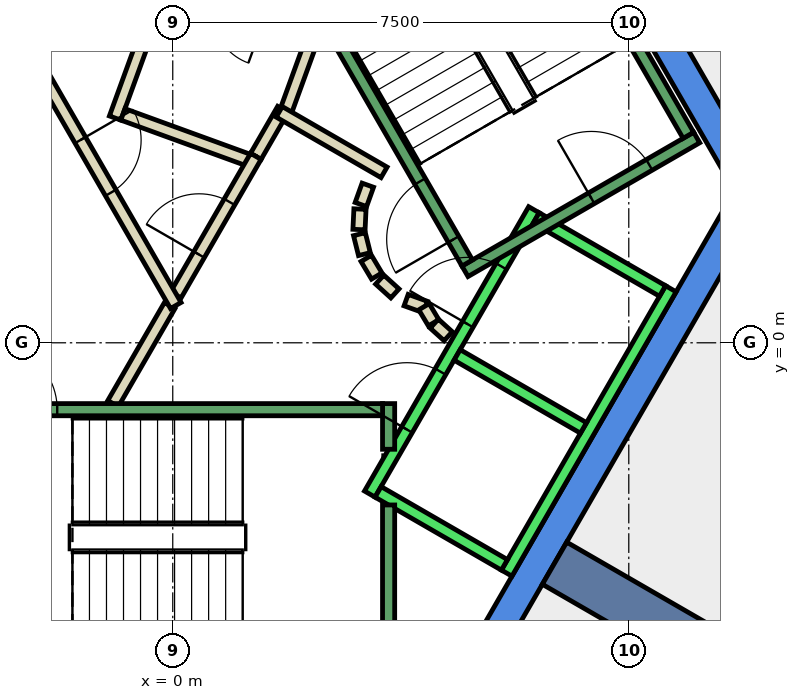
"""IFC4 building model, lengths in metres.
Left out: names, types, materials, properties, quantities, classifications, styles, units other than length and angle.
Written with IfcOpenShell. Run it as: python <this file> out.ifc"""

import sys

from ifc_helpers import new_model, si_unit, direction, frame, frame_2d, origin, place, context, subcontext, project, spatial, polyline, rectangle, outline, extrude, element, fill, save


model = new_model("IFC4")
c1 = context("Model", 3, precision=1e-05, world=origin(), true_north=direction((0.0, 1.0)))
c2 = subcontext(c1, "Body", "Model", "MODEL_VIEW")
j1 = project(units=[si_unit("LENGTHUNIT", "METRE"), si_unit("PLANEANGLEUNIT", "RADIAN")], contexts=[c1])
p1 = place(None, origin())
s1 = spatial("IfcSite", under=j1, at=p1, CompositionType="ELEMENT")
p2 = place(p1, origin())
s2 = spatial("IfcBuilding", under=s1, at=p2, CompositionType="ELEMENT")
p3 = place(p2, frame((0.0, 0.0, 322.4)))
s3 = spatial("IfcBuildingStorey", under=s2, at=p3, CompositionType="ELEMENT", Elevation=322.4)
p4 = place(p3, frame((0.0, 0.0, -0.34)))
e1 = element("IfcWall", 1, at=p4, inside=s3, PredefinedType="SHEAR", context=c2, shape_type="SweptSolid", body=[
    extrude(outline(polyline([(5.486, 9.998), (5.053, 9.748), (9.238, 2.5), (9.815, 2.5), (5.486, 9.998)])), origin(), (0.0, 0.0, 1.0), 3.34),
])
p5 = place(p3, frame((0.0, 0.0, -0.34)))
e2 = element("IfcWall", 2, at=p5, inside=s3, PredefinedType="SHEAR", context=c2, shape_type="SweptSolid", body=[
    extrude(outline(polyline([(4.907, -6.0), (9.815, 2.5), (9.238, 2.5), (4.619, -5.5), (4.907, -6.0)])), origin(), (0.0, 0.0, 1.0), 3.34),
])
p6 = place(p3, frame((6.279, -3.625, -0.34), z_axis=(0.0, 0.0, 1.0), x_axis=(0.866017533419, -0.500013631625, 0.0)))
e3 = element("IfcWall", 3, at=p6, inside=s3, PredefinedType="SHEAR", context=c2, shape_type="SweptSolid", body=[
    extrude(rectangle(XDim=9.0, YDim=0.8, at=frame_2d((4.5, 0.0))), origin(), (0.0, 0.0, 1.0), 3.34),
])
p7 = place(p3, frame((1.366, 3.066, 0.0), z_axis=(0.0, 0.0, 1.0), x_axis=(0.499698775601, 0.866199245938, 0.0)))
e4 = element("IfcWall", 4, at=p7, inside=s3, PredefinedType="PARTITIONING", context=c2, shape_type="SweptSolid", body=[
    extrude(rectangle(XDim=0.893, YDim=0.2, at=frame_2d((0.446, 0.0))), origin(), (0.0, 0.0, 1.0), 3.0),
])
p8 = place(p3, frame((1.838, 3.748, 0.0), z_axis=(0.0, 0.0, 1.0), x_axis=(0.341883255813, 0.939742432475, 0.0)))
e5 = element("IfcWall", 5, at=p8, inside=s3, PredefinedType="PARTITIONING", context=c2, shape_type="SweptSolid", body=[
    extrude(rectangle(XDim=1.398, YDim=0.2, at=frame_2d((0.699, 0.0))), origin(), (0.0, 0.0, 1.0), 3.0),
])
p9 = place(p3, frame((-0.127, 5.952, 0.0), z_axis=(0.0, 0.0, 1.0), x_axis=(-0.342012513308, -0.93969539785, 0.0)))
e6 = element("IfcWall", 6, at=p9, inside=s3, PredefinedType="PARTITIONING", context=c2, shape_type="SweptSolid", body=[
    extrude(rectangle(XDim=2.401, YDim=0.2, at=frame_2d((1.2, 0.0))), origin(), (0.0, 0.0, 1.0), 3.0),
])
p10 = place(p3, frame((-0.82, 3.756, 0.0), z_axis=(0.0, 0.0, 1.0), x_axis=(0.939740098492, -0.34188967122, 0.0)))
e7 = element("IfcWall", 7, at=p10, inside=s3, PredefinedType="PARTITIONING", context=c2, shape_type="SweptSolid", body=[
    extrude(rectangle(XDim=2.273, YDim=0.2, at=frame_2d((1.136, 0.0))), origin(), (0.0, 0.0, 1.0), 3.0),
])
p11 = place(p3, frame((-0.982, -1.0, 0.0), z_axis=(0.0, 0.0, 1.0), x_axis=(0.50024047865, 0.865886518847, 0.0)))
e8 = element("IfcWall", 8, at=p11, inside=s3, PredefinedType="PARTITIONING", context=c2, shape_type="SweptSolid", body=[
    extrude(rectangle(XDim=1.863, YDim=0.2, at=frame_2d((0.931, 0.0))), origin(), (0.0, 0.0, 1.0), 3.0),
])
p12 = place(p3, frame((0.05, 0.787, 0.0), z_axis=(0.0, 0.0, 1.0), x_axis=(0.500070457302, 0.865984721421, 0.0)))
e9 = element("IfcWall", 9, at=p12, inside=s3, PredefinedType="PARTITIONING", context=c2, shape_type="SweptSolid", body=[
    extrude(rectangle(XDim=2.631, YDim=0.2, at=frame_2d((1.316, 0.0))), origin(), (0.0, 0.0, 1.0), 3.0),
])
p13 = place(p12, frame((0.766, 0.0, 0.0)))
e10 = element("IfcOpeningElement", 10, at=p13, cuts=e9, PredefinedType="OPENING", context=c2, shape_type="SweptSolid", body=[
    extrude(rectangle(XDim=1.0, YDim=2.1, at=frame_2d((0.5, 1.05))), frame((0.0, 0.11, 0.0), z_axis=(0.0, -1.0, 0.0), x_axis=(1.0, 0.0, 0.0)), (0.0, 0.0, 1.0), 0.22),
])
p14 = place(p3, frame((1.751, 3.798, 0.0), z_axis=(0.0, 0.0, 1.0), x_axis=(0.866091650241, -0.499885240213, 0.0)))
e11 = element("IfcWall", 11, at=p14, inside=s3, PredefinedType="PARTITIONING", context=c2, shape_type="SweptSolid", body=[
    extrude(rectangle(XDim=1.991, YDim=0.2, at=frame_2d((0.995, 0.0))), origin(), (0.0, 0.0, 1.0), 3.0),
])
p15 = place(p3, frame((3.208, 2.592, 0.0), z_axis=(0.0, 0.0, 1.0), x_axis=(-0.337388820924, -0.941365382578, 0.0)))
e12 = element("IfcWall", 12, at=p15, inside=s3, PredefinedType="PARTITIONING", context=c2, shape_type="SweptSolid", body=[
    extrude(rectangle(XDim=0.338, YDim=0.2, at=frame_2d((0.169, 0.0))), origin(), (0.0, 0.0, 1.0), 3.0),
])
p16 = place(p3, frame((3.079, 2.199, 0.0), z_axis=(0.0, 0.0, 1.0), x_axis=(-0.047771483479, -0.998858290933, 0.0)))
e13 = element("IfcWall", 13, at=p16, inside=s3, PredefinedType="PARTITIONING", context=c2, shape_type="SweptSolid", body=[
    extrude(rectangle(XDim=0.337, YDim=0.2, at=frame_2d((0.169, 0.0))), origin(), (0.0, 0.0, 1.0), 3.0),
])
p17 = place(p3, frame((3.07, 1.786, 0.0), z_axis=(0.0, 0.0, 1.0), x_axis=(0.242705583207, -0.970099994784, 0.0)))
e14 = element("IfcWall", 14, at=p17, inside=s3, PredefinedType="PARTITIONING", context=c2, shape_type="SweptSolid", body=[
    extrude(rectangle(XDim=0.338, YDim=0.2, at=frame_2d((0.169, 0.0))), origin(), (0.0, 0.0, 1.0), 3.0),
])
for number, where, z_axis, x_axis in (
    (15, (3.182, 1.388, 0.0), (0.0, 0.0, 1.0), (0.512, -0.859, 0.0)),
    (16, (3.404, 1.039, 0.0), (0.0, 0.0, 1.0), (0.74, -0.672, 0.0)),
):
    element("IfcWall", number, at=place(p3, frame(where, z_axis=z_axis, x_axis=x_axis)), inside=s3, PredefinedType="PARTITIONING", context=c2, shape_type="SweptSolid", body=[
        extrude(rectangle(XDim=0.338, YDim=0.2, at=frame_2d((0.169, 0.0))), origin(), (0.0, 0.0, 1.0), 3.0),
    ])
p18 = place(p3, frame((3.838, 0.702, 0.0), z_axis=(0.0, 0.0, 1.0), x_axis=(0.941035081519, -0.338308993895, 0.0)))
e17 = element("IfcWall", 17, at=p18, inside=s3, PredefinedType="PARTITIONING", context=c2, shape_type="SweptSolid", body=[
    extrude(rectangle(XDim=0.337, YDim=0.2, at=frame_2d((0.168, 0.0))), origin(), (0.0, 0.0, 1.0), 3.0),
])
p19 = place(p3, frame((4.132, 0.593, 0.0), z_axis=(0.0, 0.0, 1.0), x_axis=(0.513561617048, -0.858052717201, 0.0)))
e18 = element("IfcWall", 18, at=p19, inside=s3, PredefinedType="PARTITIONING", context=c2, shape_type="SweptSolid", body=[
    extrude(rectangle(XDim=0.308, YDim=0.2, at=frame_2d((0.154, 0.0))), origin(), (0.0, 0.0, 1.0), 3.0),
])
p20 = place(p3, frame((4.301, 0.315, 0.0), z_axis=(0.0, 0.0, 1.0), x_axis=(0.741798017506, -0.670623367639, 0.0)))
e19 = element("IfcWall", 19, at=p20, inside=s3, PredefinedType="PARTITIONING", context=c2, shape_type="SweptSolid", body=[
    extrude(rectangle(XDim=0.309, YDim=0.2, at=frame_2d((0.154, 0.0))), origin(), (0.0, 0.0, 1.0), 3.0),
])
p21 = place(p3, frame((-2.54, 5.1, 0.0), z_axis=(0.0, 0.0, 1.0), x_axis=(0.499925051871, -0.866068670783, 0.0)))
e20 = element("IfcWall", 20, at=p21, inside=s3, PredefinedType="PARTITIONING", context=c2, shape_type="SweptSolid", body=[
    extrude(rectangle(XDim=5.181, YDim=0.2, at=frame_2d((2.59, 0.0))), origin(), (0.0, 0.0, 1.0), 3.0),
])
p22 = place(p21, frame((2.04, 0.0, 0.0)))
e21 = element("IfcOpeningElement", 21, at=p22, cuts=e20, PredefinedType="OPENING", context=c2, shape_type="SweptSolid", body=[
    extrude(rectangle(XDim=1.0, YDim=2.1, at=frame_2d((0.5, 1.05))), frame((0.0, 0.11, 0.0), z_axis=(0.0, -1.0, 0.0), x_axis=(1.0, 0.0, 0.0)), (0.0, 0.0, 1.0), 0.22),
])
p23 = place(p3, frame((3.24, -2.488, 0.0), z_axis=(0.0, 0.0, 1.0), x_axis=(0.500034260056, 0.866005622828, 0.0)))
e22 = element("IfcWall", 22, at=p23, inside=s3, PredefinedType="STANDARD", context=c2, shape_type="SweptSolid", body=[
    extrude(rectangle(XDim=5.399, YDim=0.2, at=frame_2d((2.7, 0.0))), origin(), (0.0, 0.0, 1.0), 3.0),
])
p24 = place(p23, frame((3.225, 0.0, 0.0)))
e23 = element("IfcOpeningElement", 23, at=p24, cuts=e22, PredefinedType="OPENING", context=c2, shape_type="SweptSolid", body=[
    extrude(rectangle(XDim=1.1, YDim=2.1, at=frame_2d((0.55, 1.05))), frame((0.0, 0.11, 0.0), z_axis=(0.0, -1.0, 0.0), x_axis=(1.0, 0.0, 0.0)), (0.0, 0.0, 1.0), 0.22),
])
p25 = place(p23, frame((1.225, 0.0, 0.0)))
e24 = element("IfcOpeningElement", 24, at=p25, cuts=e22, PredefinedType="OPENING", context=c2, shape_type="SweptSolid", body=[
    extrude(rectangle(XDim=1.1, YDim=2.1, at=frame_2d((0.55, 1.05))), frame((0.0, 0.11, 0.0), z_axis=(0.0, -1.0, 0.0), x_axis=(1.0, 0.0, 0.0)), (0.0, 0.0, 1.0), 0.22),
])
p26 = place(p3, frame((5.492, -3.788, 0.0), z_axis=(0.0, 0.0, 1.0), x_axis=(0.500034260056, 0.866005622828, 0.0)))
e25 = element("IfcWall", 25, at=p26, inside=s3, PredefinedType="STANDARD", context=c2, shape_type="SweptSolid", body=[
    extrude(rectangle(XDim=5.399, YDim=0.2, at=frame_2d((2.7, 0.0))), origin(), (0.0, 0.0, 1.0), 3.0),
])
p27 = place(p3, frame((3.377, -2.452, 0.0), z_axis=(0.0, 0.0, 1.0), x_axis=(0.865955154139, -0.50012165622, 0.0)))
e26 = element("IfcWall", 26, at=p27, inside=s3, PredefinedType="STANDARD", context=c2, shape_type="SweptSolid", body=[
    extrude(rectangle(XDim=2.4, YDim=0.2, at=frame_2d((1.2, 0.0))), origin(), (0.0, 0.0, 1.0), 3.0),
])
for number, where, z_axis, x_axis in (
    (27, (4.677, -0.2, 0.0), (0.0, 0.0, 1.0), (0.866, -0.5, 0.0)),
    (28, (5.977, 2.052, 0.0), (0.0, 0.0, 1.0), (0.866, -0.5, 0.0)),
):
    element("IfcWall", number, at=place(p3, frame(where, z_axis=z_axis, x_axis=x_axis)), inside=s3, PredefinedType="STANDARD", context=c2, shape_type="SweptSolid", body=[
        extrude(rectangle(XDim=2.399, YDim=0.2, at=frame_2d((1.2, 0.0))), origin(), (0.0, 0.0, 1.0), 3.0),
    ])
p28 = place(p3, frame((3.55, -2.667, 0.0), z_axis=(0.0, 0.0, 1.0), x_axis=(0.0, -1.0, 0.0)))
e29 = element("IfcWall", 29, at=p28, inside=s3, PredefinedType="STANDARD", context=c2, shape_type="SweptSolid", body=[
    extrude(rectangle(XDim=2.733, YDim=0.2, at=frame_2d((1.366, 0.0))), origin(), (0.0, 0.0, 1.0), 3.0),
])
p29 = place(p3, frame((3.55, -1.0, 0.0), z_axis=(0.0, 0.0, 1.0), x_axis=(0.0, -1.0, 0.0)))
e30 = element("IfcWall", 30, at=p29, inside=s3, PredefinedType="STANDARD", context=c2, shape_type="SweptSolid", body=[
    extrude(rectangle(XDim=0.751, YDim=0.2, at=frame_2d((0.375, 0.0))), origin(), (0.0, 0.0, 1.0), 3.0),
])
p30 = place(p3, frame((-3.45, -1.1, 0.0), z_axis=(0.0, 0.0, 1.0), x_axis=(1.0, 0.0, 0.0)))
e31 = element("IfcWall", 31, at=p30, inside=s3, PredefinedType="STANDARD", context=c2, shape_type="SweptSolid", body=[
    extrude(rectangle(XDim=6.9, YDim=0.2, at=frame_2d((3.45, 0.0))), origin(), (0.0, 0.0, 1.0), 3.0),
])
p31 = place(p30, frame((0.45, 0.0, 0.0)))
e32 = element("IfcOpeningElement", 32, at=p31, cuts=e31, PredefinedType="OPENING", context=c2, shape_type="SweptSolid", body=[
    extrude(rectangle(XDim=1.1, YDim=2.2, at=frame_2d((0.55, 1.1))), frame((0.0, 0.11, 0.0), z_axis=(0.0, -1.0, 0.0), x_axis=(1.0, 0.0, 0.0)), (0.0, 0.0, 1.0), 0.22),
])
p32 = place(p3, frame((4.806, 1.176, 0.0), z_axis=(0.0, 0.0, 1.0), x_axis=(0.866059941101, 0.499940174841, 0.0)))
e33 = element("IfcWall", 33, at=p32, inside=s3, PredefinedType="STANDARD", context=c2, shape_type="SweptSolid", body=[
    extrude(rectangle(XDim=4.4, YDim=0.2, at=frame_2d((2.2, 0.0))), origin(), (0.0, 0.0, 1.0), 3.0),
])
p33 = place(p32, frame((2.4, 0.0, 0.0)))
e34 = element("IfcOpeningElement", 34, at=p33, cuts=e33, PredefinedType="OPENING", context=c2, shape_type="SweptSolid", body=[
    extrude(rectangle(XDim=1.1, YDim=2.2, at=frame_2d((0.55, 1.1))), frame((0.0, 0.11, 0.0), z_axis=(0.0, -1.0, 0.0), x_axis=(1.0, 0.0, 0.0)), (0.0, 0.0, 1.0), 0.22),
])
p34 = place(p3, frame((4.843, 1.312, 0.0), z_axis=(0.0, 0.0, 1.0), x_axis=(-0.499963383562, 0.866046543262, 0.0)))
e35 = element("IfcWall", 35, at=p34, inside=s3, PredefinedType="STANDARD", context=c2, shape_type="SweptSolid", body=[
    extrude(rectangle(XDim=6.9, YDim=0.2, at=frame_2d((3.45, 0.0))), origin(), (0.0, 0.0, 1.0), 3.0),
])
p35 = place(p34, frame((0.45, 0.0, 0.0)))
e36 = element("IfcOpeningElement", 36, at=p35, cuts=e35, PredefinedType="OPENING", context=c2, shape_type="SweptSolid", body=[
    extrude(rectangle(XDim=1.1, YDim=2.2, at=frame_2d((0.55, 1.1))), frame((0.0, 0.11, 0.0), z_axis=(0.0, -1.0, 0.0), x_axis=(1.0, 0.0, 0.0)), (0.0, 0.0, 1.0), 0.22),
])
p36 = place(p3, frame((8.48, 3.412, 0.0), z_axis=(0.0, 0.0, 1.0), x_axis=(-0.499978703459, 0.866037698999, 0.0)))
e37 = element("IfcWall", 37, at=p36, inside=s3, PredefinedType="STANDARD", context=c2, shape_type="SweptSolid", body=[
    extrude(rectangle(XDim=6.9, YDim=0.2, at=frame_2d((3.45, 0.0))), origin(), (0.0, 0.0, 1.0), 3.0),
])
p37 = place(p3, frame((-1.393, 7.288, 0.0), z_axis=(0.0, 0.0, 1.0), x_axis=(-0.499963383562, -0.866046543262, 0.0)))
e38 = element("IfcWall", 38, at=p37, inside=s3, PredefinedType="STANDARD", context=c2, shape_type="SweptSolid", body=[
    extrude(rectangle(XDim=6.9, YDim=0.2, at=frame_2d((3.45, 0.0))), origin(), (0.0, 0.0, 1.0), 3.0),
])
p38 = place(p37, frame((0.45, 0.0, 0.0)))
e39 = element("IfcOpeningElement", 39, at=p38, cuts=e38, PredefinedType="OPENING", context=c2, shape_type="SweptSolid", body=[
    extrude(rectangle(XDim=1.1, YDim=2.2, at=frame_2d((0.55, 1.1))), frame((0.0, 0.11, 0.0), z_axis=(0.0, -1.0, 0.0), x_axis=(1.0, 0.0, 0.0)), (0.0, 0.0, 1.0), 0.22),
])
p39 = place(p13, origin())
e40 = element("IfcDoor", 40, at=p39, inside=s3, OperationType="SINGLE_SWING_RIGHT", PredefinedType="DOOR", context=c2, shape_type="SweptSolid", body=[
    extrude(rectangle(XDim=1.0, YDim=2.1, at=frame_2d((0.5, 1.05))), frame((0.0, 0.025, 0.0), z_axis=(0.0, -1.0, 0.0), x_axis=(1.0, 0.0, 0.0)), (0.0, 0.0, 1.0), 0.05),
])
fill(e10, e40)
p40 = place(p22, origin())
e41 = element("IfcDoor", 41, at=p40, inside=s3, OperationType="SINGLE_SWING_RIGHT", PredefinedType="DOOR", context=c2, shape_type="SweptSolid", body=[
    extrude(rectangle(XDim=1.0, YDim=2.1, at=frame_2d((0.5, 1.05))), frame((0.0, 0.025, 0.0), z_axis=(0.0, -1.0, 0.0), x_axis=(1.0, 0.0, 0.0)), (0.0, 0.0, 1.0), 0.05),
])
fill(e21, e41)
p41 = place(p24, origin())
e42 = element("IfcDoor", 42, at=p41, inside=s3, OperationType="SLIDING_TO_LEFT", PredefinedType="DOOR", context=c2, shape_type="SweptSolid", body=[
    extrude(rectangle(XDim=1.1, YDim=2.1, at=frame_2d((0.55, 1.05))), frame((0.0, 0.025, 0.0), z_axis=(0.0, -1.0, 0.0), x_axis=(1.0, 0.0, 0.0)), (0.0, 0.0, 1.0), 0.05),
])
fill(e23, e42)
p42 = place(p25, origin())
e43 = element("IfcDoor", 43, at=p42, inside=s3, OperationType="SLIDING_TO_LEFT", PredefinedType="DOOR", context=c2, shape_type="SweptSolid", body=[
    extrude(rectangle(XDim=1.1, YDim=2.1, at=frame_2d((0.55, 1.05))), frame((0.0, 0.025, 0.0), z_axis=(0.0, -1.0, 0.0), x_axis=(1.0, 0.0, 0.0)), (0.0, 0.0, 1.0), 0.05),
])
fill(e24, e43)
p43 = place(p31, origin())
e44 = element("IfcDoor", 44, at=p43, inside=s3, OperationType="SINGLE_SWING_LEFT", PredefinedType="DOOR", context=c2, shape_type="SweptSolid", body=[
    extrude(rectangle(XDim=1.1, YDim=2.2, at=frame_2d((0.55, 1.1))), frame((0.0, 0.025, 0.0), z_axis=(0.0, -1.0, 0.0), x_axis=(1.0, 0.0, 0.0)), (0.0, 0.0, 1.0), 0.05),
])
fill(e32, e44)
p44 = place(p35, origin())
e45 = element("IfcDoor", 45, at=p44, inside=s3, OperationType="SINGLE_SWING_LEFT", PredefinedType="DOOR", context=c2, shape_type="SweptSolid", body=[
    extrude(rectangle(XDim=1.1, YDim=2.2, at=frame_2d((0.55, 1.1))), frame((0.0, 0.025, 0.0), z_axis=(0.0, -1.0, 0.0), x_axis=(1.0, 0.0, 0.0)), (0.0, 0.0, 1.0), 0.05),
])
fill(e36, e45)
p45 = place(p33, origin())
e46 = element("IfcDoor", 46, at=p45, inside=s3, OperationType="SINGLE_SWING_LEFT", PredefinedType="DOOR", context=c2, shape_type="SweptSolid", body=[
    extrude(rectangle(XDim=1.1, YDim=2.2, at=frame_2d((0.55, 1.1))), frame((0.0, 0.025, 0.0), z_axis=(0.0, -1.0, 0.0), x_axis=(1.0, 0.0, 0.0)), (0.0, 0.0, 1.0), 0.05),
])
fill(e34, e46)
save(model, sys.argv[1])
